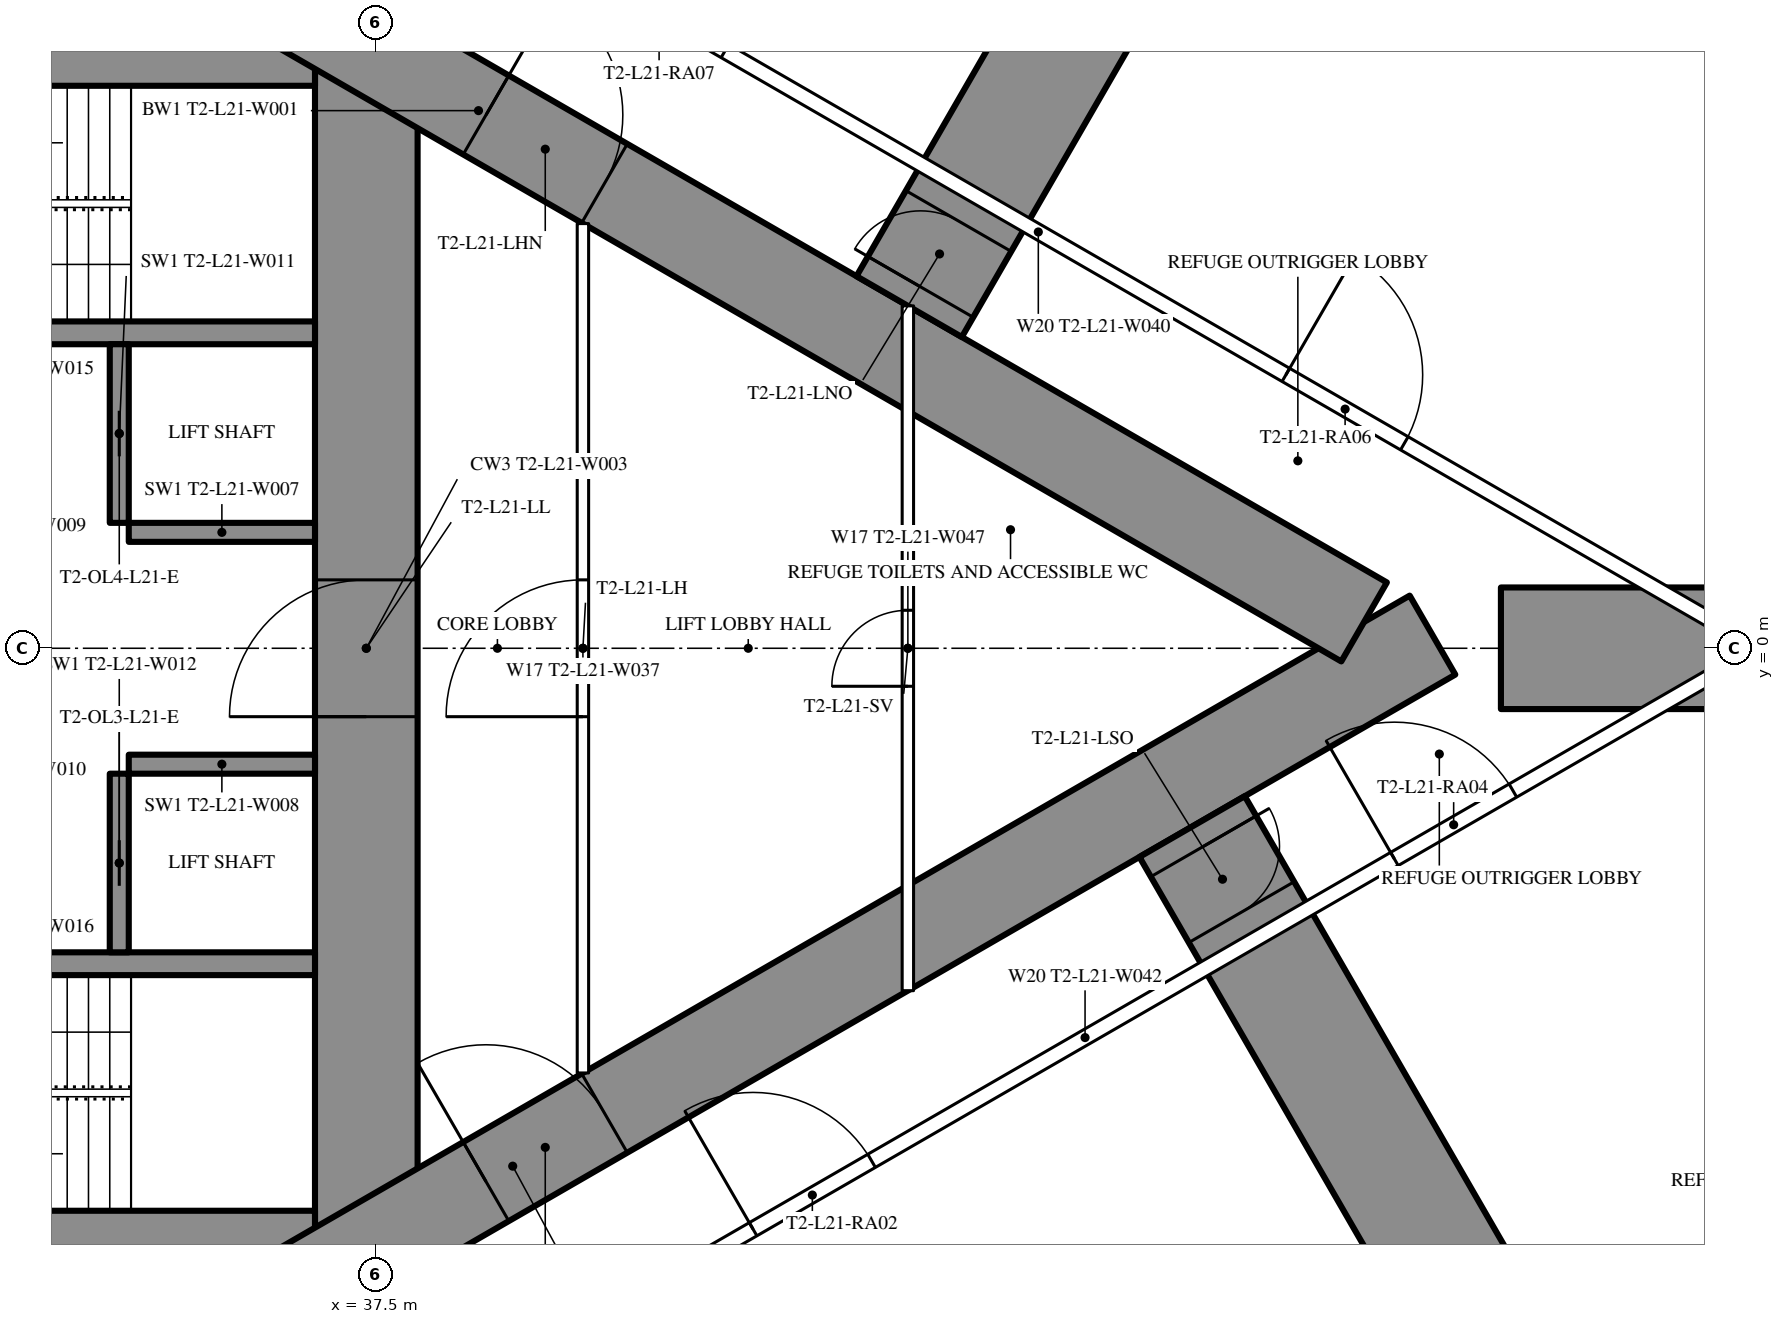
"""IFC4 building model, lengths in metres.
Left out: names, types, materials, properties, quantities, classifications, styles, units other than length and angle.
Written with IfcOpenShell. Run it as: python <this file> out.ifc"""

import sys

from ifc_helpers import new_model, si_unit, direction, frame, frame_2d, origin, place, context, subcontext, project, spatial, rectangle, extrude, element, fill, save


model = new_model("IFC4")
c1 = context("Model", 3, precision=1e-05, world=origin(), true_north=direction((0.0, 1.0)))
c2 = subcontext(c1, "Body", "Model", "MODEL_VIEW")
j1 = project(units=[si_unit("LENGTHUNIT", "METRE"), si_unit("PLANEANGLEUNIT", "RADIAN")], contexts=[c1])
p1 = place(None, origin())
s1 = spatial("IfcSite", under=j1, at=p1, CompositionType="ELEMENT")
p2 = place(p1, origin())
s2 = spatial("IfcBuilding", under=s1, at=p2, CompositionType="ELEMENT")
p3 = place(p2, frame((0.0, 0.0, 81.0)))
s3 = spatial("IfcBuildingStorey", under=s2, at=p3, CompositionType="ELEMENT", Elevation=81.0)
p4 = place(p3, frame((37.375, -8.6, 0.0), z_axis=(0.0, 0.0, 1.0), x_axis=(0.0, 1.0, 0.0)))
e1 = element("IfcWall", 1, at=p4, inside=s3, PredefinedType="SHEAR", context=c2, shape_type="SweptSolid", body=[
    extrude(rectangle(XDim=17.2, YDim=1.35, at=frame_2d((8.6, 0.0))), origin(), (0.0, 0.0, 1.0), 6.0),
])
p5 = place(p4, frame((7.7, 0.0, 0.0)))
e2 = element("IfcOpeningElement", 2, at=p5, cuts=e1, PredefinedType="OPENING", context=c2, shape_type="SweptSolid", body=[
    extrude(rectangle(XDim=1.8, YDim=2.2, at=frame_2d((0.9, 1.1))), frame((0.0, 0.685, 0.0), z_axis=(0.0, -1.0, 0.0), x_axis=(1.0, 0.0, 0.0)), (0.0, 0.0, 1.0), 1.37),
])
p6 = place(p3, frame((28.3, -8.0, 0.0), z_axis=(0.0, 0.0, 1.0), x_axis=(1.0, 0.0, 0.0)))
e3 = element("IfcWall", 3, at=p6, inside=s3, PredefinedType="SHEAR", context=c2, shape_type="SweptSolid", body=[
    extrude(rectangle(XDim=8.4, YDim=1.2, at=frame_2d((4.2, 0.0))), origin(), (0.0, 0.0, 1.0), 6.0),
])
p7 = place(p6, frame((0.25, 0.0, 0.0)))
e4 = element("IfcOpeningElement", 4, at=p7, cuts=e3, PredefinedType="OPENING", context=c2, shape_type="SweptSolid", body=[
    extrude(rectangle(XDim=1.0, YDim=2.2, at=frame_2d((0.5, 1.1))), frame((0.0, 0.61, 0.0), z_axis=(0.0, -1.0, 0.0), x_axis=(1.0, 0.0, 0.0)), (0.0, 0.0, 1.0), 1.22),
])
p8 = place(p3, frame((28.3, 8.0, 0.0), z_axis=(0.0, 0.0, 1.0), x_axis=(1.0, 0.0, 0.0)))
e5 = element("IfcWall", 5, at=p8, inside=s3, PredefinedType="SHEAR", context=c2, shape_type="SweptSolid", body=[
    extrude(rectangle(XDim=8.4, YDim=1.2, at=frame_2d((4.2, 0.0))), origin(), (0.0, 0.0, 1.0), 6.0),
])
p9 = place(p8, frame((0.25, 0.0, 0.0)))
e6 = element("IfcOpeningElement", 6, at=p9, cuts=e5, PredefinedType="OPENING", context=c2, shape_type="SweptSolid", body=[
    extrude(rectangle(XDim=1.0, YDim=2.2, at=frame_2d((0.5, 1.1))), frame((0.0, 0.61, 0.0), z_axis=(0.0, -1.0, 0.0), x_axis=(1.0, 0.0, 0.0)), (0.0, 0.0, 1.0), 1.22),
])
for number, where, z_axis, x_axis in (
    (7, (28.3, -4.15, 0.0), (0.0, 0.0, 1.0), (1.0, 0.0, 0.0)),
    (8, (28.3, 4.15, 0.0), (0.0, 0.0, 1.0), (1.0, 0.0, 0.0)),
):
    element("IfcWall", number, at=place(p3, frame(where, z_axis=z_axis, x_axis=x_axis)), inside=s3, PredefinedType="SHEAR", context=c2, shape_type="SweptSolid", body=[
        extrude(rectangle(XDim=8.4, YDim=0.3, at=frame_2d((4.2, 0.0))), origin(), (0.0, 0.0, 1.0), 6.0),
    ])
p10 = place(p3, frame((34.125, -4.0, 0.0), z_axis=(0.0, 0.0, 1.0), x_axis=(0.0, 1.0, 0.0)))
e9 = element("IfcWall", 9, at=p10, inside=s3, PredefinedType="SHEAR", context=c2, shape_type="SweptSolid", body=[
    extrude(rectangle(XDim=2.35, YDim=0.25, at=frame_2d((1.175, 0.0))), origin(), (0.0, 0.0, 1.0), 6.0),
])
p11 = place(p10, frame((0.875, 0.0, 0.0)))
e10 = element("IfcOpeningElement", 10, at=p11, cuts=e9, PredefinedType="OPENING", context=c2, shape_type="SweptSolid", body=[
    extrude(rectangle(XDim=0.6, YDim=2.0, at=frame_2d((0.3, 1.0))), frame((0.0, 0.135, 0.0), z_axis=(0.0, -1.0, 0.0), x_axis=(1.0, 0.0, 0.0)), (0.0, 0.0, 1.0), 0.27),
])
p12 = place(p3, frame((34.25, -1.525, 0.0), z_axis=(0.0, 0.0, 1.0), x_axis=(1.0, 0.0, 0.0)))
e11 = element("IfcWall", 11, at=p12, inside=s3, PredefinedType="SHEAR", context=c2, shape_type="SweptSolid", body=[
    extrude(rectangle(XDim=2.45, YDim=0.25, at=frame_2d((1.225, 0.0))), origin(), (0.0, 0.0, 1.0), 6.0),
])
p13 = place(p3, frame((34.125, 1.65, 0.0), z_axis=(0.0, 0.0, 1.0), x_axis=(0.0, 1.0, 0.0)))
e12 = element("IfcWall", 12, at=p13, inside=s3, PredefinedType="SHEAR", context=c2, shape_type="SweptSolid", body=[
    extrude(rectangle(XDim=2.35, YDim=0.25, at=frame_2d((1.175, 0.0))), origin(), (0.0, 0.0, 1.0), 6.0),
])
p14 = place(p13, frame((0.875, 0.0, 0.0)))
e13 = element("IfcOpeningElement", 13, at=p14, cuts=e12, PredefinedType="OPENING", context=c2, shape_type="SweptSolid", body=[
    extrude(rectangle(XDim=0.6, YDim=2.0, at=frame_2d((0.3, 1.0))), frame((0.0, 0.135, 0.0), z_axis=(0.0, -1.0, 0.0), x_axis=(1.0, 0.0, 0.0)), (0.0, 0.0, 1.0), 0.27),
])
p15 = place(p3, frame((34.25, 1.525, 0.0), z_axis=(0.0, 0.0, 1.0), x_axis=(1.0, 0.0, 0.0)))
e14 = element("IfcWall", 14, at=p15, inside=s3, PredefinedType="SHEAR", context=c2, shape_type="SweptSolid", body=[
    extrude(rectangle(XDim=2.45, YDim=0.25, at=frame_2d((1.225, 0.0))), origin(), (0.0, 0.0, 1.0), 6.0),
])
p16 = place(p3, frame((27.2, -13.8, 0.0), z_axis=(0.0, 0.0, 1.0), x_axis=(0.866027159892, 0.499996958321, 0.0)))
e15 = element("IfcWall", 15, at=p16, inside=s3, PredefinedType="SHEAR", context=c2, shape_type="SweptSolid", body=[
    extrude(rectangle(XDim=27.947, YDim=1.2, at=frame_2d((13.973, 0.0))), origin(), (0.0, 0.0, 1.0), 6.0),
])
p17 = place(p16, frame((4.6, 0.0, 0.0)))
e16 = element("IfcOpeningElement", 16, at=p17, cuts=e15, PredefinedType="OPENING", context=c2, shape_type="SweptSolid", body=[
    extrude(rectangle(XDim=1.0, YDim=2.2, at=frame_2d((0.5, 1.1))), frame((0.0, 0.61, 0.0), z_axis=(0.0, -1.0, 0.0), x_axis=(1.0, 0.0, 0.0)), (0.0, 0.0, 1.0), 1.22),
])
p18 = place(p16, frame((13.568, 0.0, 0.0)))
e17 = element("IfcOpeningElement", 17, at=p18, cuts=e15, PredefinedType="OPENING", context=c2, shape_type="SweptSolid", body=[
    extrude(rectangle(XDim=1.8, YDim=2.2, at=frame_2d((0.9, 1.1))), frame((0.0, 0.61, 0.0), z_axis=(0.0, -1.0, 0.0), x_axis=(1.0, 0.0, 0.0)), (0.0, 0.0, 1.0), 1.22),
])
p19 = place(p3, frame((27.2, 13.8, 0.0), z_axis=(0.0, 0.0, 1.0), x_axis=(0.866024515034, -0.500001539357, 0.0)))
e18 = element("IfcWall", 18, at=p19, inside=s3, PredefinedType="SHEAR", context=c2, shape_type="SweptSolid", body=[
    extrude(rectangle(XDim=26.907, YDim=1.2, at=frame_2d((13.454, 0.0))), origin(), (0.0, 0.0, 1.0), 6.0),
])
p20 = place(p19, frame((4.6, 0.0, 0.0)))
e19 = element("IfcOpeningElement", 19, at=p20, cuts=e18, PredefinedType="OPENING", context=c2, shape_type="SweptSolid", body=[
    extrude(rectangle(XDim=1.0, YDim=2.2, at=frame_2d((0.5, 1.1))), frame((0.0, 0.61, 0.0), z_axis=(0.0, -1.0, 0.0), x_axis=(1.0, 0.0, 0.0)), (0.0, 0.0, 1.0), 1.22),
])
p21 = place(p19, frame((13.568, 0.0, 0.0)))
e20 = element("IfcOpeningElement", 20, at=p21, cuts=e18, PredefinedType="OPENING", context=c2, shape_type="SweptSolid", body=[
    extrude(rectangle(XDim=1.8, YDim=2.2, at=frame_2d((0.9, 1.1))), frame((0.0, 0.61, 0.0), z_axis=(0.0, -1.0, 0.0), x_axis=(1.0, 0.0, 0.0)), (0.0, 0.0, 1.0), 1.22),
])
p22 = place(p3, frame((48.239, -2.346, 0.0), z_axis=(0.0, 0.0, 1.0), x_axis=(0.500006130383, -0.866021864377, 0.0)))
e21 = element("IfcWall", 21, at=p22, inside=s3, PredefinedType="SHEAR", context=c2, shape_type="SweptSolid", body=[
    extrude(rectangle(XDim=13.112, YDim=1.6, at=frame_2d((6.556, 0.0))), origin(), (0.0, 0.0, 1.0), 6.0),
])
p23 = place(p22, frame((0.3, 0.0, 0.0)))
e22 = element("IfcOpeningElement", 22, at=p23, cuts=e21, PredefinedType="OPENING", context=c2, shape_type="SweptSolid", body=[
    extrude(rectangle(XDim=1.0, YDim=2.2, at=frame_2d((0.5, 1.1))), frame((0.0, 0.81, 0.0), z_axis=(0.0, -1.0, 0.0), x_axis=(1.0, 0.0, 0.0)), (0.0, 0.0, 1.0), 1.62),
])
p24 = place(p3, frame((52.302, 0.0, 0.0), z_axis=(0.0, 0.0, 1.0), x_axis=(1.0, 0.0, 0.0)))
e23 = element("IfcWall", 23, at=p24, inside=s3, PredefinedType="SHEAR", context=c2, shape_type="SweptSolid", body=[
    extrude(rectangle(XDim=9.198, YDim=1.6, at=frame_2d((4.599, 0.0))), origin(), (0.0, 0.0, 1.0), 6.0),
])
p25 = place(p3, frame((44.517, 4.495, 0.0), z_axis=(0.0, 0.0, 1.0), x_axis=(0.500003233568, 0.866023536875, 0.0)))
e24 = element("IfcWall", 24, at=p25, inside=s3, PredefinedType="SHEAR", context=c2, shape_type="SweptSolid", body=[
    extrude(rectangle(XDim=13.122, YDim=1.6, at=frame_2d((6.561, 0.0))), origin(), (0.0, 0.0, 1.0), 6.0),
])
p26 = place(p25, frame((0.3, 0.0, 0.0)))
e25 = element("IfcOpeningElement", 25, at=p26, cuts=e24, PredefinedType="OPENING", context=c2, shape_type="SweptSolid", body=[
    extrude(rectangle(XDim=1.0, YDim=2.2, at=frame_2d((0.5, 1.1))), frame((0.0, 0.81, 0.0), z_axis=(0.0, -1.0, 0.0), x_axis=(1.0, 0.0, 0.0)), (0.0, 0.0, 1.0), 1.62),
])
p27 = place(p3, frame((37.96, -10.243, 0.0), z_axis=(0.0, 0.0, 1.0), x_axis=(0.866026429433, 0.499998223521, 0.0)))
e26 = element("IfcWall", 26, at=p27, inside=s3, PredefinedType="PARTITIONING", context=c2, shape_type="SweptSolid", body=[
    extrude(rectangle(XDim=20.487, YDim=0.2, at=frame_2d((10.243, 0.0))), origin(), (0.0, 0.0, 1.0), 5.75),
])
p28 = place(p27, frame((14.943, 0.0, 0.0)))
e27 = element("IfcOpeningElement", 27, at=p28, cuts=e26, PredefinedType="OPENING", context=c2, shape_type="SweptSolid", body=[
    extrude(rectangle(XDim=1.8, YDim=2.2, at=frame_2d((0.9, 1.1))), frame((0.0, 0.11, 0.0), z_axis=(0.0, -1.0, 0.0), x_axis=(1.0, 0.0, 0.0)), (0.0, 0.0, 1.0), 0.22),
])
p29 = place(p27, frame((5.2, 0.0, 0.0)))
e28 = element("IfcOpeningElement", 28, at=p29, cuts=e26, PredefinedType="OPENING", context=c2, shape_type="SweptSolid", body=[
    extrude(rectangle(XDim=1.8, YDim=2.2, at=frame_2d((0.9, 1.1))), frame((0.0, 0.11, 0.0), z_axis=(0.0, -1.0, 0.0), x_axis=(1.0, 0.0, 0.0)), (0.0, 0.0, 1.0), 0.22),
])
p30 = place(p3, frame((36.834, 10.894, 0.0), z_axis=(0.0, 0.0, 1.0), x_axis=(0.866028157229, -0.499995230863, 0.0)))
e29 = element("IfcWall", 29, at=p30, inside=s3, PredefinedType="PARTITIONING", context=c2, shape_type="SweptSolid", body=[
    extrude(rectangle(XDim=21.667, YDim=0.2, at=frame_2d((10.833, 0.0))), origin(), (0.0, 0.0, 1.0), 5.75),
])
p31 = place(p30, frame((14.594, 0.0, 0.0)))
e30 = element("IfcOpeningElement", 30, at=p31, cuts=e29, PredefinedType="OPENING", context=c2, shape_type="SweptSolid", body=[
    extrude(rectangle(XDim=1.8, YDim=2.2, at=frame_2d((0.9, 1.1))), frame((0.0, 0.11, 0.0), z_axis=(0.0, -1.0, 0.0), x_axis=(1.0, 0.0, 0.0)), (0.0, 0.0, 1.0), 0.22),
])
p32 = place(p30, frame((4.073, 0.0, 0.0)))
e31 = element("IfcOpeningElement", 31, at=p32, cuts=e29, PredefinedType="OPENING", context=c2, shape_type="SweptSolid", body=[
    extrude(rectangle(XDim=2.0, YDim=2.4, at=frame_2d((1.0, 1.2))), frame((0.0, 0.11, 0.0), z_axis=(0.0, -1.0, 0.0), x_axis=(1.0, 0.0, 0.0)), (0.0, 0.0, 1.0), 0.22),
])
p33 = place(p3, frame((40.225, -5.587, 0.0), z_axis=(0.0, 0.0, 1.0), x_axis=(0.0, 1.0, 0.0)))
e32 = element("IfcWall", 32, at=p33, inside=s3, PredefinedType="PARTITIONING", context=c2, shape_type="SweptSolid", body=[
    extrude(rectangle(XDim=11.174, YDim=0.15, at=frame_2d((5.587, 0.0))), origin(), (0.0, 0.0, 1.0), 5.75),
])
p34 = place(p33, frame((4.687, 0.0, 0.0)))
e33 = element("IfcOpeningElement", 33, at=p34, cuts=e32, PredefinedType="OPENING", context=c2, shape_type="SweptSolid", body=[
    extrude(rectangle(XDim=1.8, YDim=2.2, at=frame_2d((0.9, 1.1))), frame((0.0, 0.085, 0.0), z_axis=(0.0, -1.0, 0.0), x_axis=(1.0, 0.0, 0.0)), (0.0, 0.0, 1.0), 0.17),
])
p35 = place(p3, frame((44.5, -4.505, 0.0), z_axis=(0.0, 0.0, 1.0), x_axis=(0.0, 1.0, 0.0)))
e34 = element("IfcWall", 34, at=p35, inside=s3, PredefinedType="PARTITIONING", context=c2, shape_type="SweptSolid", body=[
    extrude(rectangle(XDim=9.009, YDim=0.15, at=frame_2d((4.505, 0.0))), origin(), (0.0, 0.0, 1.0), 5.75),
])
p36 = place(p35, frame((4.005, 0.0, 0.0)))
e35 = element("IfcOpeningElement", 35, at=p36, cuts=e34, PredefinedType="OPENING", context=c2, shape_type="SweptSolid", body=[
    extrude(rectangle(XDim=1.0, YDim=2.2, at=frame_2d((0.5, 1.1))), frame((0.0, 0.085, 0.0), z_axis=(0.0, -1.0, 0.0), x_axis=(1.0, 0.0, 0.0)), (0.0, 0.0, 1.0), 0.17),
])
p37 = place(p23, origin())
e36 = element("IfcDoor", 36, at=p37, inside=s3, OperationType="SINGLE_SWING_LEFT", PredefinedType="DOOR", context=c2, shape_type="SweptSolid", body=[
    extrude(rectangle(XDim=1.0, YDim=2.2, at=frame_2d((0.5, 1.1))), frame((0.0, 0.025, 0.0), z_axis=(0.0, -1.0, 0.0), x_axis=(1.0, 0.0, 0.0)), (0.0, 0.0, 1.0), 0.05),
])
fill(e22, e36)
p38 = place(p26, origin())
e37 = element("IfcDoor", 37, at=p38, inside=s3, OperationType="SINGLE_SWING_LEFT", PredefinedType="DOOR", context=c2, shape_type="SweptSolid", body=[
    extrude(rectangle(XDim=1.0, YDim=2.2, at=frame_2d((0.5, 1.1))), frame((0.0, 0.025, 0.0), z_axis=(0.0, -1.0, 0.0), x_axis=(1.0, 0.0, 0.0)), (0.0, 0.0, 1.0), 0.05),
])
fill(e25, e37)
p39 = place(p28, origin())
e38 = element("IfcDoor", 38, at=p39, inside=s3, OperationType="DOUBLE_DOOR_SINGLE_SWING", PredefinedType="DOOR", context=c2, shape_type="SweptSolid", body=[
    extrude(rectangle(XDim=1.8, YDim=2.2, at=frame_2d((0.9, 1.1))), frame((0.0, 0.025, 0.0), z_axis=(0.0, -1.0, 0.0), x_axis=(1.0, 0.0, 0.0)), (0.0, 0.0, 1.0), 0.05),
])
fill(e27, e38)
p40 = place(p31, origin())
e39 = element("IfcDoor", 39, at=p40, inside=s3, OperationType="DOUBLE_DOOR_SINGLE_SWING", PredefinedType="DOOR", context=c2, shape_type="SweptSolid", body=[
    extrude(rectangle(XDim=1.8, YDim=2.2, at=frame_2d((0.9, 1.1))), frame((0.0, 0.025, 0.0), z_axis=(0.0, -1.0, 0.0), x_axis=(1.0, 0.0, 0.0)), (0.0, 0.0, 1.0), 0.05),
])
fill(e30, e39)
p41 = place(p32, origin())
e40 = element("IfcDoor", 40, at=p41, inside=s3, OperationType="DOUBLE_DOOR_SINGLE_SWING", PredefinedType="DOOR", context=c2, shape_type="SweptSolid", body=[
    extrude(rectangle(XDim=2.0, YDim=2.4, at=frame_2d((1.0, 1.2))), frame((0.0, 0.025, 0.0), z_axis=(0.0, -1.0, 0.0), x_axis=(1.0, 0.0, 0.0)), (0.0, 0.0, 1.0), 0.05),
])
fill(e31, e40)
p42 = place(p29, origin())
e41 = element("IfcDoor", 41, at=p42, inside=s3, OperationType="DOUBLE_DOOR_SINGLE_SWING", PredefinedType="DOOR", context=c2, shape_type="SweptSolid", body=[
    extrude(rectangle(XDim=1.8, YDim=2.2, at=frame_2d((0.9, 1.1))), frame((0.0, 0.025, 0.0), z_axis=(0.0, -1.0, 0.0), x_axis=(1.0, 0.0, 0.0)), (0.0, 0.0, 1.0), 0.05),
])
fill(e28, e41)
p43 = place(p34, origin())
e42 = element("IfcDoor", 42, at=p43, inside=s3, OperationType="DOUBLE_DOOR_SINGLE_SWING", PredefinedType="DOOR", context=c2, shape_type="SweptSolid", body=[
    extrude(rectangle(XDim=1.8, YDim=2.2, at=frame_2d((0.9, 1.1))), frame((0.0, 0.025, 0.0), z_axis=(0.0, -1.0, 0.0), x_axis=(1.0, 0.0, 0.0)), (0.0, 0.0, 1.0), 0.05),
])
fill(e33, e42)
p44 = place(p36, origin())
e43 = element("IfcDoor", 43, at=p44, inside=s3, OperationType="SINGLE_SWING_LEFT", PredefinedType="DOOR", context=c2, shape_type="SweptSolid", body=[
    extrude(rectangle(XDim=1.0, YDim=2.2, at=frame_2d((0.5, 1.1))), frame((0.0, 0.025, 0.0), z_axis=(0.0, -1.0, 0.0), x_axis=(1.0, 0.0, 0.0)), (0.0, 0.0, 1.0), 0.05),
])
fill(e35, e43)
p45 = place(p18, origin())
e44 = element("IfcDoor", 44, at=p45, inside=s3, OperationType="DOUBLE_DOOR_SINGLE_SWING", PredefinedType="DOOR", context=c2, shape_type="SweptSolid", body=[
    extrude(rectangle(XDim=1.8, YDim=2.2, at=frame_2d((0.9, 1.1))), frame((0.0, 0.025, 0.0), z_axis=(0.0, -1.0, 0.0), x_axis=(1.0, 0.0, 0.0)), (0.0, 0.0, 1.0), 0.05),
])
fill(e17, e44)
p46 = place(p21, origin())
e45 = element("IfcDoor", 45, at=p46, inside=s3, OperationType="DOUBLE_DOOR_SINGLE_SWING", PredefinedType="DOOR", context=c2, shape_type="SweptSolid", body=[
    extrude(rectangle(XDim=1.8, YDim=2.2, at=frame_2d((0.9, 1.1))), frame((0.0, 0.025, 0.0), z_axis=(0.0, -1.0, 0.0), x_axis=(1.0, 0.0, 0.0)), (0.0, 0.0, 1.0), 0.05),
])
fill(e20, e45)
p47 = place(p5, origin())
e46 = element("IfcDoor", 46, at=p47, inside=s3, OperationType="DOUBLE_DOOR_SINGLE_SWING", PredefinedType="DOOR", context=c2, shape_type="SweptSolid", body=[
    extrude(rectangle(XDim=1.8, YDim=2.2, at=frame_2d((0.9, 1.1))), frame((0.0, 0.025, 0.0), z_axis=(0.0, -1.0, 0.0), x_axis=(1.0, 0.0, 0.0)), (0.0, 0.0, 1.0), 0.05),
])
fill(e2, e46)
p48 = place(p11, origin())
e47 = element("IfcDoor", 47, at=p48, inside=s3, OperationType="SLIDING_TO_LEFT", PredefinedType="DOOR", context=c2, shape_type="SweptSolid", body=[
    extrude(rectangle(XDim=0.6, YDim=2.0, at=frame_2d((0.3, 1.0))), frame((0.0, 0.025, 0.0), z_axis=(0.0, -1.0, 0.0), x_axis=(1.0, 0.0, 0.0)), (0.0, 0.0, 1.0), 0.05),
])
fill(e10, e47)
p49 = place(p14, origin())
e48 = element("IfcDoor", 48, at=p49, inside=s3, OperationType="SLIDING_TO_LEFT", PredefinedType="DOOR", context=c2, shape_type="SweptSolid", body=[
    extrude(rectangle(XDim=0.6, YDim=2.0, at=frame_2d((0.3, 1.0))), frame((0.0, 0.025, 0.0), z_axis=(0.0, -1.0, 0.0), x_axis=(1.0, 0.0, 0.0)), (0.0, 0.0, 1.0), 0.05),
])
fill(e13, e48)
save(model, sys.argv[1])
